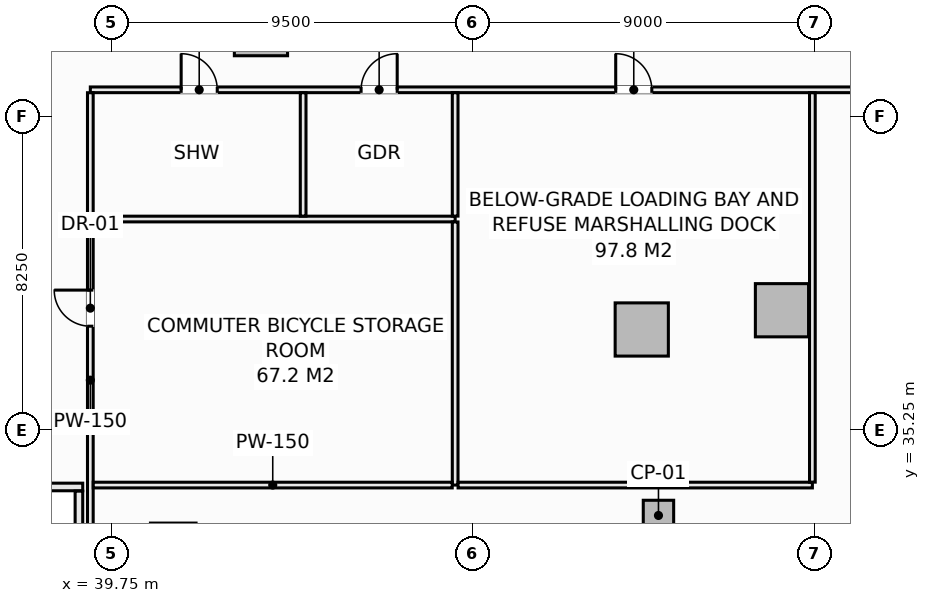
"""IFC4 building model, lengths in metres.
Left out: names, types, materials, properties, quantities, classifications, styles, units other than length and angle.
Written with IfcOpenShell. Run it as: python <this file> out.ifc"""

import sys

from ifc_helpers import new_model, si_unit, direction, frame, frame_2d, origin, origin_2d, place, context, subcontext, project, spatial, rectangle, extrude, element, fill, save


model = new_model("IFC4")
c1 = context("Model", 3, precision=1e-05, world=origin(), true_north=direction((0.0, 1.0)))
c2 = subcontext(c1, "Body", "Model", "MODEL_VIEW")
j1 = project(units=[si_unit("LENGTHUNIT", "METRE"), si_unit("PLANEANGLEUNIT", "RADIAN")], contexts=[c1])
p1 = place(None, origin())
s1 = spatial("IfcSite", under=j1, at=p1, CompositionType="ELEMENT")
p2 = place(p1, origin())
s2 = spatial("IfcBuilding", under=s1, at=p2, CompositionType="ELEMENT")
p3 = place(p2, frame((0.0, 0.0, -4.5)))
s3 = spatial("IfcBuildingStorey", under=s2, at=p3, CompositionType="ELEMENT", Elevation=-4.5)
for number, where, z_axis, x_axis in (
    (1, (53.71, 37.894, -0.32), (0.0, 0.0, 1.0), (1.0, 0.0, 0.0)),
    (2, (43.69, 45.796, -0.32), (0.0, 0.0, 1.0), (1.0, 0.0, 0.0)),
    (3, (57.4, 38.4, -0.32), (0.0, 0.0, 1.0), (1.0, 0.0, 0.0)),
):
    element("IfcColumn", number, at=place(p3, frame(where, z_axis=z_axis, x_axis=x_axis)), inside=s3, PredefinedType="COLUMN", context=c2, shape_type="SweptSolid", body=[
        extrude(rectangle(XDim=1.4, YDim=1.4, at=origin_2d()), origin(), (0.0, 0.0, 1.0), 4.46),
    ])
p4 = place(p3, frame((54.15, 33.0, -0.32), z_axis=(0.0, 0.0, 1.0), x_axis=(1.0, 0.0, 0.0)))
e4 = element("IfcColumn", 4, at=p4, inside=s3, PredefinedType="PILASTER", context=c2, shape_type="SweptSolid", body=[
    extrude(rectangle(XDim=0.8, YDim=0.8, at=origin_2d()), origin(), (0.0, 0.0, 1.0), 4.46),
])
p5 = place(p3, frame((36.75, 33.75, 0.0), z_axis=(0.0, 0.0, 1.0), x_axis=(1.0, 0.0, 0.0)))
e5 = element("IfcWall", 5, at=p5, inside=s3, PredefinedType="SOLIDWALL", context=c2, shape_type="SweptSolid", body=[
    extrude(rectangle(XDim=2.25, YDim=0.2, at=frame_2d((1.125, 0.0))), origin(), (0.0, 0.0, 1.0), 4.14),
])
p6 = place(p3, frame((38.9, 31.21, 0.0), z_axis=(0.0, 0.0, 1.0), x_axis=(0.0, 1.0, 0.0)))
e6 = element("IfcWall", 6, at=p6, inside=s3, PredefinedType="SOLIDWALL", context=c2, shape_type="SweptSolid", body=[
    extrude(rectangle(XDim=2.43, YDim=0.2, at=frame_2d((1.215, 0.0))), origin(), (0.0, 0.0, 1.0), 4.14),
])
p7 = place(p3, frame((39.2, 44.2, 0.0), z_axis=(0.0, 0.0, 1.0), x_axis=(1.0, 0.0, 0.0)))
e7 = element("IfcWall", 7, at=p7, inside=s3, PredefinedType="PARTITIONING", context=c2, shape_type="SweptSolid", body=[
    extrude(rectangle(XDim=22.238, YDim=0.15, at=frame_2d((11.119, 0.0))), origin(), (0.0, 0.0, 1.0), 3.663),
])
p8 = place(p7, frame((2.39, 0.0, 0.0)))
e8 = element("IfcOpeningElement", 8, at=p8, cuts=e7, PredefinedType="OPENING", context=c2, shape_type="SweptSolid", body=[
    extrude(rectangle(XDim=0.95, YDim=2.1, at=frame_2d((0.475, 1.05))), frame((0.0, 0.085, 0.0), z_axis=(0.0, -1.0, 0.0), x_axis=(1.0, 0.0, 0.0)), (0.0, 0.0, 1.0), 0.17),
])
p9 = place(p7, frame((7.125, 0.0, 0.0)))
e9 = element("IfcOpeningElement", 9, at=p9, cuts=e7, PredefinedType="OPENING", context=c2, shape_type="SweptSolid", body=[
    extrude(rectangle(XDim=0.95, YDim=2.1, at=frame_2d((0.475, 1.05))), frame((0.0, 0.085, 0.0), z_axis=(0.0, -1.0, 0.0), x_axis=(1.0, 0.0, 0.0)), (0.0, 0.0, 1.0), 0.17),
])
p10 = place(p7, frame((13.825, 0.0, 0.0)))
e10 = element("IfcOpeningElement", 10, at=p10, cuts=e7, PredefinedType="OPENING", context=c2, shape_type="SweptSolid", body=[
    extrude(rectangle(XDim=0.95, YDim=2.1, at=frame_2d((0.475, 1.05))), frame((0.0, 0.085, 0.0), z_axis=(0.0, -1.0, 0.0), x_axis=(1.0, 0.0, 0.0)), (0.0, 0.0, 1.0), 0.17),
])
p11 = place(p3, frame((39.2, 28.997, 0.0), z_axis=(0.0, 0.0, 1.0), x_axis=(0.0, 1.0, 0.0)))
e11 = element("IfcWall", 11, at=p11, inside=s3, PredefinedType="PARTITIONING", context=c2, shape_type="SweptSolid", body=[
    extrude(rectangle(XDim=15.126, YDim=0.15, at=frame_2d((7.563, 0.0))), origin(), (0.0, 0.0, 1.0), 3.374),
])
p12 = place(p11, frame((8.983, 0.0, 0.0)))
e12 = element("IfcOpeningElement", 12, at=p12, cuts=e11, PredefinedType="OPENING", context=c2, shape_type="SweptSolid", body=[
    extrude(rectangle(XDim=0.95, YDim=2.1, at=frame_2d((0.475, 1.05))), frame((0.0, 0.085, 0.0), z_axis=(0.0, -1.0, 0.0), x_axis=(1.0, 0.0, 0.0)), (0.0, 0.0, 1.0), 0.17),
])
p13 = place(p3, frame((39.277, 40.8, 0.0), z_axis=(0.0, 0.0, 1.0), x_axis=(1.0, 0.0, 0.0)))
e13 = element("IfcWall", 13, at=p13, inside=s3, PredefinedType="PARTITIONING", context=c2, shape_type="SweptSolid", body=[
    extrude(rectangle(XDim=9.523, YDim=0.15, at=frame_2d((4.761, 0.0))), origin(), (0.0, 0.0, 1.0), 3.775),
])
p14 = place(p3, frame((48.8, 33.8, 0.0), z_axis=(0.0, 0.0, 1.0), x_axis=(0.0, 1.0, 0.0)))
e14 = element("IfcWall", 14, at=p14, inside=s3, PredefinedType="PARTITIONING", context=c2, shape_type="SweptSolid", body=[
    extrude(rectangle(XDim=6.923, YDim=0.15, at=frame_2d((3.461, 0.0))), origin(), (0.0, 0.0, 1.0), 4.14),
])
p15 = place(p3, frame((48.8, 40.877, 0.0), z_axis=(0.0, 0.0, 1.0), x_axis=(0.0, 1.0, 0.0)))
e15 = element("IfcWall", 15, at=p15, inside=s3, PredefinedType="PARTITIONING", context=c2, shape_type="SweptSolid", body=[
    extrude(rectangle(XDim=3.246, YDim=0.15, at=frame_2d((1.623, 0.0))), origin(), (0.0, 0.0, 1.0), 4.14),
])
p16 = place(p3, frame((39.277, 33.8, 0.0), z_axis=(0.0, 0.0, 1.0), x_axis=(1.0, 0.0, 0.0)))
e16 = element("IfcWall", 16, at=p16, inside=s3, PredefinedType="PARTITIONING", context=c2, shape_type="SweptSolid", body=[
    extrude(rectangle(XDim=9.446, YDim=0.15, at=frame_2d((4.723, 0.0))), origin(), (0.0, 0.0, 1.0), 3.232),
])
p17 = place(p3, frame((48.877, 33.8, 0.0), z_axis=(0.0, 0.0, 1.0), x_axis=(1.0, 0.0, 0.0)))
e17 = element("IfcWall", 17, at=p17, inside=s3, PredefinedType="PARTITIONING", context=c2, shape_type="SweptSolid", body=[
    extrude(rectangle(XDim=9.323, YDim=0.15, at=frame_2d((4.662, 0.0))), origin(), (0.0, 0.0, 1.0), 4.14),
])
p18 = place(p3, frame((44.8, 40.877, 0.0), z_axis=(0.0, 0.0, 1.0), x_axis=(0.0, 1.0, 0.0)))
e18 = element("IfcWall", 18, at=p18, inside=s3, PredefinedType="PARTITIONING", context=c2, shape_type="SweptSolid", body=[
    extrude(rectangle(XDim=3.246, YDim=0.15, at=frame_2d((1.623, 0.0))), origin(), (0.0, 0.0, 1.0), 4.14),
])
p19 = place(p3, frame((58.2, 33.877, 0.0), z_axis=(0.0, 0.0, 1.0), x_axis=(0.0, 1.0, 0.0)))
e19 = element("IfcWall", 19, at=p19, inside=s3, PredefinedType="PARTITIONING", context=c2, shape_type="SweptSolid", body=[
    extrude(rectangle(XDim=10.246, YDim=0.15, at=frame_2d((5.123, 0.0))), origin(), (0.0, 0.0, 1.0), 4.14),
])
p20 = place(p12, origin())
e20 = element("IfcDoor", 20, at=p20, inside=s3, OperationType="SINGLE_SWING_RIGHT", PredefinedType="DOOR", context=c2, shape_type="SweptSolid", body=[
    extrude(rectangle(XDim=0.95, YDim=2.1, at=frame_2d((0.475, 1.05))), frame((0.0, 0.025, 0.0), z_axis=(0.0, -1.0, 0.0), x_axis=(1.0, 0.0, 0.0)), (0.0, 0.0, 1.0), 0.05),
])
fill(e12, e20)
p21 = place(p8, origin())
e21 = element("IfcDoor", 21, at=p21, inside=s3, OperationType="SINGLE_SWING_LEFT", PredefinedType="DOOR", context=c2, shape_type="SweptSolid", body=[
    extrude(rectangle(XDim=0.95, YDim=2.1, at=frame_2d((0.475, 1.05))), frame((0.0, 0.025, 0.0), z_axis=(0.0, -1.0, 0.0), x_axis=(1.0, 0.0, 0.0)), (0.0, 0.0, 1.0), 0.05),
])
fill(e8, e21)
p22 = place(p9, origin())
e22 = element("IfcDoor", 22, at=p22, inside=s3, OperationType="SINGLE_SWING_RIGHT", PredefinedType="DOOR", context=c2, shape_type="SweptSolid", body=[
    extrude(rectangle(XDim=0.95, YDim=2.1, at=frame_2d((0.475, 1.05))), frame((0.0, 0.025, 0.0), z_axis=(0.0, -1.0, 0.0), x_axis=(1.0, 0.0, 0.0)), (0.0, 0.0, 1.0), 0.05),
])
fill(e9, e22)
p23 = place(p10, origin())
e23 = element("IfcDoor", 23, at=p23, inside=s3, OperationType="SINGLE_SWING_LEFT", PredefinedType="DOOR", context=c2, shape_type="SweptSolid", body=[
    extrude(rectangle(XDim=0.95, YDim=2.1, at=frame_2d((0.475, 1.05))), frame((0.0, 0.025, 0.0), z_axis=(0.0, -1.0, 0.0), x_axis=(1.0, 0.0, 0.0)), (0.0, 0.0, 1.0), 0.05),
])
fill(e10, e23)
save(model, sys.argv[1])
